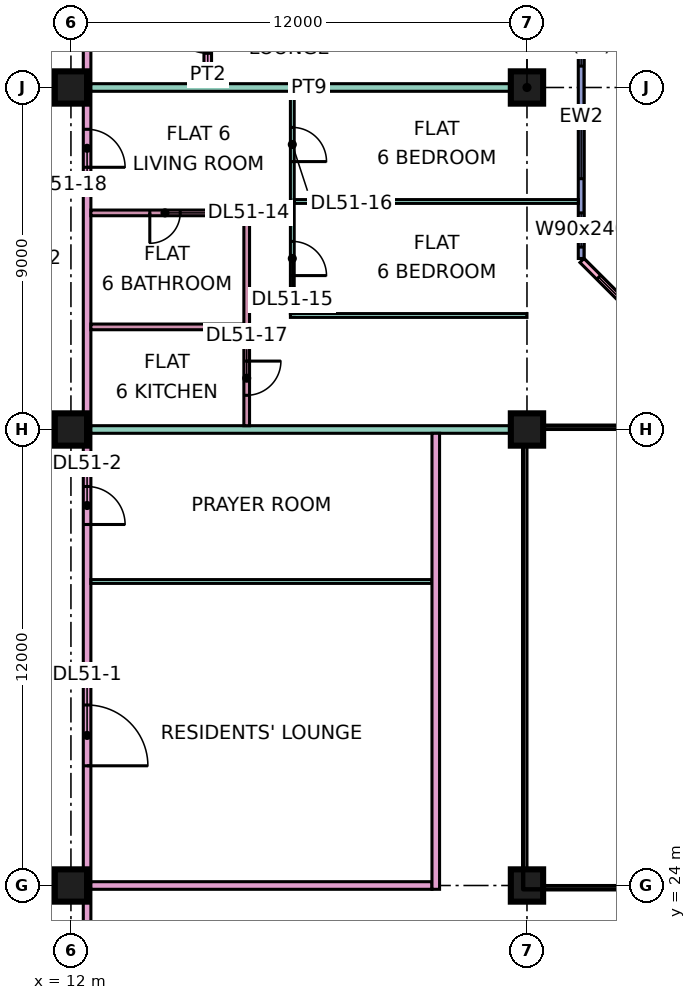
"""IFC4 building model, lengths in metres.
Left out: names, types, materials, properties, quantities, classifications, styles, units other than length and angle.
Written with IfcOpenShell. Run it as: python <this file> out.ifc"""

import sys

from ifc_helpers import new_model, si_unit, direction, frame, frame_2d, origin, origin_2d, place, context, subcontext, project, spatial, rectangle, extrude, element, fill, save


model = new_model("IFC4")
c1 = context("Model", 3, precision=1e-05, world=origin(), true_north=direction((0.0, 1.0)))
c2 = subcontext(c1, "Body", "Model", "MODEL_VIEW")
j1 = project(units=[si_unit("LENGTHUNIT", "METRE"), si_unit("PLANEANGLEUNIT", "RADIAN")], contexts=[c1])
p1 = place(None, origin())
s1 = spatial("IfcSite", under=j1, at=p1, CompositionType="ELEMENT")
p2 = place(p1, origin())
s2 = spatial("IfcBuilding", under=s1, at=p2, CompositionType="ELEMENT")
p3 = place(p2, frame((0.0, 0.0, 219.15)))
s3 = spatial("IfcBuildingStorey", under=s2, at=p3, CompositionType="ELEMENT", Elevation=219.15)
for number, where, z_axis, x_axis in (
    (1, (12.0, 24.0, 0.0), (0.0, 0.0, 1.0), (1.0, 0.0, 0.0)),
    (2, (12.0, 36.0, 0.0), (0.0, 0.0, 1.0), (1.0, 0.0, 0.0)),
    (3, (12.0, 45.0, 0.0), (0.0, 0.0, 1.0), (1.0, 0.0, 0.0)),
    (4, (24.0, 24.0, 0.0), (0.0, 0.0, 1.0), (1.0, 0.0, 0.0)),
    (5, (24.0, 36.0, 0.0), (0.0, 0.0, 1.0), (1.0, 0.0, 0.0)),
    (6, (24.0, 45.0, 0.0), (0.0, 0.0, 1.0), (1.0, 0.0, 0.0)),
):
    element("IfcColumn", number, at=place(p3, frame(where, z_axis=z_axis, x_axis=x_axis)), inside=s3, PredefinedType="COLUMN", context=c2, shape_type="SweptSolid", body=[
        extrude(rectangle(XDim=0.85, YDim=0.85, at=origin_2d()), origin(), (0.0, 0.0, 1.0), 3.75),
    ])
p4 = place(p3, frame((28.447, 37.447, 0.0), z_axis=(0.0, 0.0, 1.0), x_axis=(-0.707106781187, 0.707106781187, 0.0)))
e7 = element("IfcWall", 7, at=p4, inside=s3, PredefinedType="SOLIDWALL", context=c2, shape_type="SweptSolid", body=[
    extrude(rectangle(XDim=4.243, YDim=0.15, at=frame_2d((2.121, 0.0))), origin(), (0.0, 0.0, 1.0), 3.35),
])
p5 = place(p4, frame((0.621, 0.0, 0.45)))
e8 = element("IfcOpeningElement", 8, at=p5, cuts=e7, PredefinedType="OPENING", context=c2, shape_type="SweptSolid", body=[
    extrude(rectangle(XDim=3.0, YDim=2.4, at=frame_2d((1.5, 1.2))), frame((0.0, 0.085, 0.0), z_axis=(0.0, -1.0, 0.0), x_axis=(1.0, 0.0, 0.0)), (0.0, 0.0, 1.0), 0.17),
])
p6 = place(p3, frame((25.425, 40.5, 0.0), z_axis=(0.0, 0.0, 1.0), x_axis=(0.0, 1.0, 0.0)))
e9 = element("IfcWall", 9, at=p6, inside=s3, PredefinedType="SOLIDWALL", context=c2, shape_type="SweptSolid", body=[
    extrude(rectangle(XDim=7.425, YDim=0.15, at=frame_2d((3.712, 0.0))), origin(), (0.0, 0.0, 1.0), 3.35),
])
p7 = place(p6, frame((0.3, 0.0, 0.45)))
e10 = element("IfcOpeningElement", 10, at=p7, cuts=e9, PredefinedType="OPENING", context=c2, shape_type="SweptSolid", body=[
    extrude(rectangle(XDim=0.9, YDim=2.4, at=frame_2d((0.45, 1.2))), frame((0.0, 0.085, 0.0), z_axis=(0.0, -1.0, 0.0), x_axis=(1.0, 0.0, 0.0)), (0.0, 0.0, 1.0), 0.17),
])
p8 = place(p6, frame((2.1, 0.0, 0.45)))
e11 = element("IfcOpeningElement", 11, at=p8, cuts=e9, PredefinedType="OPENING", context=c2, shape_type="SweptSolid", body=[
    extrude(rectangle(XDim=1.8, YDim=2.4, at=frame_2d((0.9, 1.2))), frame((0.0, 0.085, 0.0), z_axis=(0.0, -1.0, 0.0), x_axis=(1.0, 0.0, 0.0)), (0.0, 0.0, 1.0), 0.17),
])
p9 = place(p6, frame((5.062, 0.0, 0.45)))
e12 = element("IfcOpeningElement", 12, at=p9, cuts=e9, PredefinedType="OPENING", context=c2, shape_type="SweptSolid", body=[
    extrude(rectangle(XDim=1.8, YDim=2.4, at=frame_2d((0.9, 1.2))), frame((0.0, 0.085, 0.0), z_axis=(0.0, -1.0, 0.0), x_axis=(1.0, 0.0, 0.0)), (0.0, 0.0, 1.0), 0.17),
])
p10 = place(p3, frame((12.425, 20.0, 0.0), z_axis=(0.0, 0.0, 1.0), x_axis=(0.0, 1.0, 0.0)))
e13 = element("IfcWall", 13, at=p10, inside=s3, PredefinedType="PARTITIONING", context=c2, shape_type="SweptSolid", body=[
    extrude(rectangle(XDim=43.0, YDim=0.2, at=frame_2d((21.5, 0.0))), origin(), (0.0, 0.0, 1.0), 3.35),
])
p11 = place(p10, frame((7.15, 0.0, 0.0)))
e14 = element("IfcOpeningElement", 14, at=p11, cuts=e13, PredefinedType="OPENING", context=c2, shape_type="SweptSolid", body=[
    extrude(rectangle(XDim=1.6, YDim=2.1, at=frame_2d((0.8, 1.05))), frame((0.0, 0.11, 0.0), z_axis=(0.0, -1.0, 0.0), x_axis=(1.0, 0.0, 0.0)), (0.0, 0.0, 1.0), 0.22),
])
p12 = place(p10, frame((13.5, 0.0, 0.0)))
e15 = element("IfcOpeningElement", 15, at=p12, cuts=e13, PredefinedType="OPENING", context=c2, shape_type="SweptSolid", body=[
    extrude(rectangle(XDim=1.0, YDim=2.1, at=frame_2d((0.5, 1.05))), frame((0.0, 0.11, 0.0), z_axis=(0.0, -1.0, 0.0), x_axis=(1.0, 0.0, 0.0)), (0.0, 0.0, 1.0), 0.22),
])
p13 = place(p10, frame((22.9, 0.0, 0.0)))
e16 = element("IfcOpeningElement", 16, at=p13, cuts=e13, PredefinedType="OPENING", context=c2, shape_type="SweptSolid", body=[
    extrude(rectangle(XDim=1.0, YDim=2.1, at=frame_2d((0.5, 1.05))), frame((0.0, 0.11, 0.0), z_axis=(0.0, -1.0, 0.0), x_axis=(1.0, 0.0, 0.0)), (0.0, 0.0, 1.0), 0.22),
])
p14 = place(p10, frame((35.35, 0.0, 0.0)))
e17 = element("IfcOpeningElement", 17, at=p14, cuts=e13, PredefinedType="OPENING", context=c2, shape_type="SweptSolid", body=[
    extrude(rectangle(XDim=1.0, YDim=2.1, at=frame_2d((0.5, 1.05))), frame((0.0, 0.11, 0.0), z_axis=(0.0, -1.0, 0.0), x_axis=(1.0, 0.0, 0.0)), (0.0, 0.0, 1.0), 0.22),
])
p15 = place(p10, frame((1.15, 0.0, 0.0)))
e18 = element("IfcOpeningElement", 18, at=p15, cuts=e13, PredefinedType="OPENING", context=c2, shape_type="SweptSolid", body=[
    extrude(rectangle(XDim=1.8, YDim=2.1, at=frame_2d((0.9, 1.05))), frame((0.0, 0.11, 0.0), z_axis=(0.0, -1.0, 0.0), x_axis=(1.0, 0.0, 0.0)), (0.0, 0.0, 1.0), 0.22),
])
p16 = place(p10, frame((28.6, 0.0, 0.0)))
e19 = element("IfcOpeningElement", 19, at=p16, cuts=e13, PredefinedType="OPENING", context=c2, shape_type="SweptSolid", body=[
    extrude(rectangle(XDim=1.8, YDim=2.1, at=frame_2d((0.9, 1.05))), frame((0.0, 0.11, 0.0), z_axis=(0.0, -1.0, 0.0), x_axis=(1.0, 0.0, 0.0)), (0.0, 0.0, 1.0), 0.22),
])
p17 = place(p3, frame((12.525, 24.0, 0.0), z_axis=(0.0, 0.0, 1.0), x_axis=(1.0, 0.0, 0.0)))
e20 = element("IfcWall", 20, at=p17, inside=s3, PredefinedType="PARTITIONING", context=c2, shape_type="SweptSolid", body=[
    extrude(rectangle(XDim=8.975, YDim=0.2, at=frame_2d((4.488, 0.0))), origin(), (0.0, 0.0, 1.0), 3.35),
])
p18 = place(p3, frame((12.525, 32.0, 0.0), z_axis=(0.0, 0.0, 1.0), x_axis=(1.0, 0.0, 0.0)))
e21 = element("IfcWall", 21, at=p18, inside=s3, PredefinedType="PARTITIONING", context=c2, shape_type="SweptSolid", body=[
    extrude(rectangle(XDim=8.975, YDim=0.1, at=frame_2d((4.488, 0.0))), origin(), (0.0, 0.0, 1.0), 3.35),
])
p19 = place(p3, frame((12.525, 36.0, 0.0), z_axis=(0.0, 0.0, 1.0), x_axis=(1.0, 0.0, 0.0)))
e22 = element("IfcWall", 22, at=p19, inside=s3, PredefinedType="PARTITIONING", context=c2, shape_type="SweptSolid", body=[
    extrude(rectangle(XDim=11.475, YDim=0.2, at=frame_2d((5.738, 0.0))), origin(), (0.0, 0.0, 1.0), 3.35),
])
p20 = place(p3, frame((12.525, 38.7, 0.0), z_axis=(0.0, 0.0, 1.0), x_axis=(1.0, 0.0, 0.0)))
e23 = element("IfcWall", 23, at=p20, inside=s3, PredefinedType="PARTITIONING", context=c2, shape_type="SweptSolid", body=[
    extrude(rectangle(XDim=4.025, YDim=0.15, at=frame_2d((2.013, 0.0))), origin(), (0.0, 0.0, 1.0), 3.35),
])
p21 = place(p3, frame((12.525, 41.7, 0.0), z_axis=(0.0, 0.0, 1.0), x_axis=(1.0, 0.0, 0.0)))
e24 = element("IfcWall", 24, at=p21, inside=s3, PredefinedType="PARTITIONING", context=c2, shape_type="SweptSolid", body=[
    extrude(rectangle(XDim=4.025, YDim=0.15, at=frame_2d((2.013, 0.0))), origin(), (0.0, 0.0, 1.0), 3.35),
])
p22 = place(p21, frame((1.55, 0.0, 0.0)))
e25 = element("IfcOpeningElement", 25, at=p22, cuts=e24, PredefinedType="OPENING", context=c2, shape_type="SweptSolid", body=[
    extrude(rectangle(XDim=0.8, YDim=2.1, at=frame_2d((0.4, 1.05))), frame((0.0, 0.085, 0.0), z_axis=(0.0, -1.0, 0.0), x_axis=(1.0, 0.0, 0.0)), (0.0, 0.0, 1.0), 0.17),
])
p23 = place(p3, frame((12.525, 45.0, 0.0), z_axis=(0.0, 0.0, 1.0), x_axis=(1.0, 0.0, 0.0)))
e26 = element("IfcWall", 26, at=p23, inside=s3, PredefinedType="PARTITIONING", context=c2, shape_type="SweptSolid", body=[
    extrude(rectangle(XDim=11.475, YDim=0.2, at=frame_2d((5.738, 0.0))), origin(), (0.0, 0.0, 1.0), 3.35),
])
p24 = place(p3, frame((15.6, 45.1, 0.0), z_axis=(0.0, 0.0, 1.0), x_axis=(0.0, 1.0, 0.0)))
e27 = element("IfcWall", 27, at=p24, inside=s3, PredefinedType="PARTITIONING", context=c2, shape_type="SweptSolid", body=[
    extrude(rectangle(XDim=2.675, YDim=0.2, at=frame_2d((1.337, 0.0))), origin(), (0.0, 0.0, 1.0), 3.35),
])
p25 = place(p24, frame((0.8, 0.0, 0.0)))
e28 = element("IfcOpeningElement", 28, at=p25, cuts=e27, PredefinedType="OPENING", context=c2, shape_type="SweptSolid", body=[
    extrude(rectangle(XDim=1.0, YDim=2.1, at=frame_2d((0.5, 1.05))), frame((0.0, 0.11, 0.0), z_axis=(0.0, -1.0, 0.0), x_axis=(1.0, 0.0, 0.0)), (0.0, 0.0, 1.0), 0.22),
])
p26 = place(p3, frame((16.625, 36.1, 0.0), z_axis=(0.0, 0.0, 1.0), x_axis=(0.0, 1.0, 0.0)))
e29 = element("IfcWall", 29, at=p26, inside=s3, PredefinedType="PARTITIONING", context=c2, shape_type="SweptSolid", body=[
    extrude(rectangle(XDim=5.675, YDim=0.15, at=frame_2d((2.837, 0.0))), origin(), (0.0, 0.0, 1.0), 3.35),
])
p27 = place(p26, frame((0.8, 0.0, 0.0)))
e30 = element("IfcOpeningElement", 30, at=p27, cuts=e29, PredefinedType="OPENING", context=c2, shape_type="SweptSolid", body=[
    extrude(rectangle(XDim=0.9, YDim=2.1, at=frame_2d((0.45, 1.05))), frame((0.0, 0.085, 0.0), z_axis=(0.0, -1.0, 0.0), x_axis=(1.0, 0.0, 0.0)), (0.0, 0.0, 1.0), 0.17),
])
p28 = place(p3, frame((17.775, 39.0, 0.0), z_axis=(0.0, 0.0, 1.0), x_axis=(1.0, 0.0, 0.0)))
e31 = element("IfcWall", 31, at=p28, inside=s3, PredefinedType="PARTITIONING", context=c2, shape_type="SweptSolid", body=[
    extrude(rectangle(XDim=6.225, YDim=0.1, at=frame_2d((3.113, 0.0))), origin(), (0.0, 0.0, 1.0), 3.35),
])
p29 = place(p3, frame((17.825, 39.05, 0.0), z_axis=(0.0, 0.0, 1.0), x_axis=(0.0, 1.0, 0.0)))
e32 = element("IfcWall", 32, at=p29, inside=s3, PredefinedType="PARTITIONING", context=c2, shape_type="SweptSolid", body=[
    extrude(rectangle(XDim=5.85, YDim=0.1, at=frame_2d((2.925, 0.0))), origin(), (0.0, 0.0, 1.0), 3.35),
])
p30 = place(p29, frame((1.0, 0.0, 0.0)))
e33 = element("IfcOpeningElement", 33, at=p30, cuts=e32, PredefinedType="OPENING", context=c2, shape_type="SweptSolid", body=[
    extrude(rectangle(XDim=0.9, YDim=2.1, at=frame_2d((0.45, 1.05))), frame((0.0, 0.06, 0.0), z_axis=(0.0, -1.0, 0.0), x_axis=(1.0, 0.0, 0.0)), (0.0, 0.0, 1.0), 0.12),
])
p31 = place(p29, frame((4.0, 0.0, 0.0)))
e34 = element("IfcOpeningElement", 34, at=p31, cuts=e32, PredefinedType="OPENING", context=c2, shape_type="SweptSolid", body=[
    extrude(rectangle(XDim=0.9, YDim=2.1, at=frame_2d((0.45, 1.05))), frame((0.0, 0.06, 0.0), z_axis=(0.0, -1.0, 0.0), x_axis=(1.0, 0.0, 0.0)), (0.0, 0.0, 1.0), 0.12),
])
p32 = place(p3, frame((17.875, 42.0, 0.0), z_axis=(0.0, 0.0, 1.0), x_axis=(1.0, 0.0, 0.0)))
e35 = element("IfcWall", 35, at=p32, inside=s3, PredefinedType="PARTITIONING", context=c2, shape_type="SweptSolid", body=[
    extrude(rectangle(XDim=7.476, YDim=0.1, at=frame_2d((3.738, 0.0))), origin(), (0.0, 0.0, 1.0), 3.35),
])
p33 = place(p3, frame((21.6, 23.9, 0.0), z_axis=(0.0, 0.0, 1.0), x_axis=(0.0, 1.0, 0.0)))
e36 = element("IfcWall", 36, at=p33, inside=s3, PredefinedType="PARTITIONING", context=c2, shape_type="SweptSolid", body=[
    extrude(rectangle(XDim=12.0, YDim=0.2, at=frame_2d((6.0, 0.0))), origin(), (0.0, 0.0, 1.0), 3.35),
])
p34 = place(p5, origin())
e37 = element("IfcWindow", 37, at=p34, inside=s3, PartitioningType="SINGLE_PANEL", PredefinedType="WINDOW", context=c2, shape_type="SweptSolid", body=[
    extrude(rectangle(XDim=3.0, YDim=2.4, at=frame_2d((1.5, 1.2))), frame((0.0, 0.03, 0.0), z_axis=(0.0, -1.0, 0.0), x_axis=(1.0, 0.0, 0.0)), (0.0, 0.0, 1.0), 0.06),
])
fill(e8, e37)
p35 = place(p7, origin())
e38 = element("IfcWindow", 38, at=p35, inside=s3, PartitioningType="SINGLE_PANEL", PredefinedType="WINDOW", context=c2, shape_type="SweptSolid", body=[
    extrude(rectangle(XDim=0.9, YDim=2.4, at=frame_2d((0.45, 1.2))), frame((0.0, 0.03, 0.0), z_axis=(0.0, -1.0, 0.0), x_axis=(1.0, 0.0, 0.0)), (0.0, 0.0, 1.0), 0.06),
])
fill(e10, e38)
p36 = place(p8, origin())
e39 = element("IfcWindow", 39, at=p36, inside=s3, PartitioningType="SINGLE_PANEL", PredefinedType="WINDOW", context=c2, shape_type="SweptSolid", body=[
    extrude(rectangle(XDim=1.8, YDim=2.4, at=frame_2d((0.9, 1.2))), frame((0.0, 0.03, 0.0), z_axis=(0.0, -1.0, 0.0), x_axis=(1.0, 0.0, 0.0)), (0.0, 0.0, 1.0), 0.06),
])
fill(e11, e39)
p37 = place(p9, origin())
e40 = element("IfcWindow", 40, at=p37, inside=s3, PartitioningType="SINGLE_PANEL", PredefinedType="WINDOW", context=c2, shape_type="SweptSolid", body=[
    extrude(rectangle(XDim=1.8, YDim=2.4, at=frame_2d((0.9, 1.2))), frame((0.0, 0.03, 0.0), z_axis=(0.0, -1.0, 0.0), x_axis=(1.0, 0.0, 0.0)), (0.0, 0.0, 1.0), 0.06),
])
fill(e12, e40)
p38 = place(p11, frame((1.6, 0.0, 0.0), z_axis=(0.0, 0.0, 1.0), x_axis=(-1.0, 0.0, 0.0)))
e41 = element("IfcDoor", 41, at=p38, inside=s3, OperationType="DOUBLE_DOOR_SINGLE_SWING", PredefinedType="DOOR", context=c2, shape_type="SweptSolid", body=[
    extrude(rectangle(XDim=1.6, YDim=2.1, at=frame_2d((0.8, 1.05))), frame((0.0, 0.025, 0.0), z_axis=(0.0, -1.0, 0.0), x_axis=(1.0, 0.0, 0.0)), (0.0, 0.0, 1.0), 0.05),
])
fill(e14, e41)
p39 = place(p12, frame((1.0, 0.0, 0.0), z_axis=(0.0, 0.0, 1.0), x_axis=(-1.0, 0.0, 0.0)))
e42 = element("IfcDoor", 42, at=p39, inside=s3, OperationType="SINGLE_SWING_LEFT", PredefinedType="DOOR", context=c2, shape_type="SweptSolid", body=[
    extrude(rectangle(XDim=1.0, YDim=2.1, at=frame_2d((0.5, 1.05))), frame((0.0, 0.025, 0.0), z_axis=(0.0, -1.0, 0.0), x_axis=(1.0, 0.0, 0.0)), (0.0, 0.0, 1.0), 0.05),
])
fill(e15, e42)
p40 = place(p22, frame((0.8, 0.0, 0.0), z_axis=(0.0, 0.0, 1.0), x_axis=(-1.0, 0.0, 0.0)))
e43 = element("IfcDoor", 43, at=p40, inside=s3, OperationType="SINGLE_SWING_LEFT", PredefinedType="DOOR", context=c2, shape_type="SweptSolid", body=[
    extrude(rectangle(XDim=0.8, YDim=2.1, at=frame_2d((0.4, 1.05))), frame((0.0, 0.025, 0.0), z_axis=(0.0, -1.0, 0.0), x_axis=(1.0, 0.0, 0.0)), (0.0, 0.0, 1.0), 0.05),
])
fill(e25, e43)
p41 = place(p30, frame((0.9, 0.0, 0.0), z_axis=(0.0, 0.0, 1.0), x_axis=(-1.0, 0.0, 0.0)))
e44 = element("IfcDoor", 44, at=p41, inside=s3, OperationType="SINGLE_SWING_LEFT", PredefinedType="DOOR", context=c2, shape_type="SweptSolid", body=[
    extrude(rectangle(XDim=0.9, YDim=2.1, at=frame_2d((0.45, 1.05))), frame((0.0, 0.025, 0.0), z_axis=(0.0, -1.0, 0.0), x_axis=(1.0, 0.0, 0.0)), (0.0, 0.0, 1.0), 0.05),
])
fill(e33, e44)
p42 = place(p31, frame((0.9, 0.0, 0.0), z_axis=(0.0, 0.0, 1.0), x_axis=(-1.0, 0.0, 0.0)))
e45 = element("IfcDoor", 45, at=p42, inside=s3, OperationType="SINGLE_SWING_LEFT", PredefinedType="DOOR", context=c2, shape_type="SweptSolid", body=[
    extrude(rectangle(XDim=0.9, YDim=2.1, at=frame_2d((0.45, 1.05))), frame((0.0, 0.025, 0.0), z_axis=(0.0, -1.0, 0.0), x_axis=(1.0, 0.0, 0.0)), (0.0, 0.0, 1.0), 0.05),
])
fill(e34, e45)
p43 = place(p27, origin())
e46 = element("IfcDoor", 46, at=p43, inside=s3, OperationType="SINGLE_SWING_RIGHT", PredefinedType="DOOR", context=c2, shape_type="SweptSolid", body=[
    extrude(rectangle(XDim=0.9, YDim=2.1, at=frame_2d((0.45, 1.05))), frame((0.0, 0.025, 0.0), z_axis=(0.0, -1.0, 0.0), x_axis=(1.0, 0.0, 0.0)), (0.0, 0.0, 1.0), 0.05),
])
fill(e30, e46)
p44 = place(p13, frame((1.0, 0.0, 0.0), z_axis=(0.0, 0.0, 1.0), x_axis=(-1.0, 0.0, 0.0)))
e47 = element("IfcDoor", 47, at=p44, inside=s3, OperationType="SINGLE_SWING_LEFT", PredefinedType="DOOR", context=c2, shape_type="SweptSolid", body=[
    extrude(rectangle(XDim=1.0, YDim=2.1, at=frame_2d((0.5, 1.05))), frame((0.0, 0.025, 0.0), z_axis=(0.0, -1.0, 0.0), x_axis=(1.0, 0.0, 0.0)), (0.0, 0.0, 1.0), 0.05),
])
fill(e16, e47)
p45 = place(p25, frame((1.0, 0.0, 0.0), z_axis=(0.0, 0.0, 1.0), x_axis=(-1.0, 0.0, 0.0)))
e48 = element("IfcDoor", 48, at=p45, inside=s3, OperationType="SINGLE_SWING_RIGHT", PredefinedType="DOOR", context=c2, shape_type="SweptSolid", body=[
    extrude(rectangle(XDim=1.0, YDim=2.1, at=frame_2d((0.5, 1.05))), frame((0.0, 0.025, 0.0), z_axis=(0.0, -1.0, 0.0), x_axis=(1.0, 0.0, 0.0)), (0.0, 0.0, 1.0), 0.05),
])
fill(e28, e48)
save(model, sys.argv[1])
